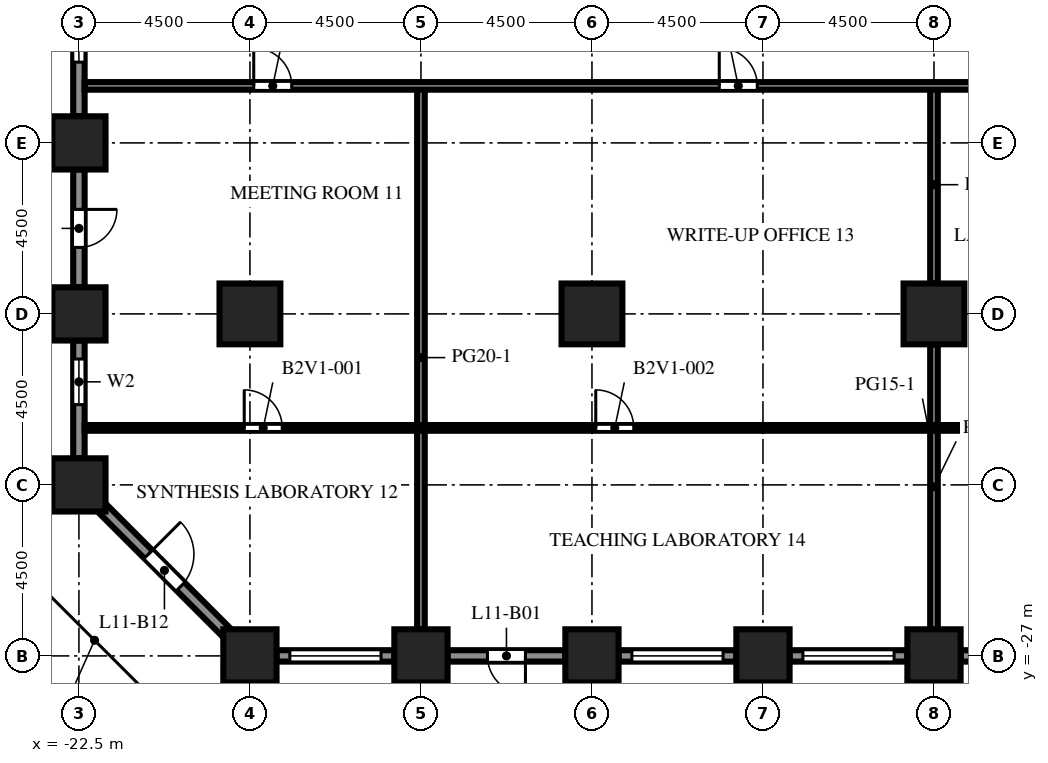
"""IFC4 building model, lengths in metres.
Left out: names, types, materials, properties, quantities, classifications, styles, units other than length and angle.
Written with IfcOpenShell. Run it as: python <this file> out.ifc"""

import sys

from ifc_helpers import new_model, si_unit, direction, frame, frame_2d, origin, origin_2d, place, context, subcontext, project, spatial, rectangle, extrude, element, fill, save


model = new_model("IFC4")
c1 = context("Model", 3, precision=1e-05, world=origin(), true_north=direction((0.0, 1.0)))
c2 = subcontext(c1, "Body", "Model", "MODEL_VIEW")
j1 = project(units=[si_unit("LENGTHUNIT", "METRE"), si_unit("PLANEANGLEUNIT", "RADIAN")], contexts=[c1])
p1 = place(None, origin())
s1 = spatial("IfcSite", under=j1, at=p1, CompositionType="ELEMENT")
p2 = place(p1, origin())
s2 = spatial("IfcBuilding", under=s1, at=p2, CompositionType="ELEMENT")
p3 = place(p2, frame((0.0, 0.0, 50.1)))
s3 = spatial("IfcBuildingStorey", under=s2, at=p3, CompositionType="ELEMENT", Elevation=50.1)
for number, where, z_axis, x_axis in (
    (1, (-22.5, -22.5, 0.0), (0.0, 0.0, 1.0), (1.0, 0.0, 0.0)),
    (2, (-22.5, -18.0, 0.0), (0.0, 0.0, 1.0), (1.0, 0.0, 0.0)),
    (3, (-22.5, -13.5, 0.0), (0.0, 0.0, 1.0), (1.0, 0.0, 0.0)),
    (4, (-18.0, -27.0, 0.0), (0.0, 0.0, 1.0), (1.0, 0.0, 0.0)),
    (5, (-13.5, -27.0, 0.0), (0.0, 0.0, 1.0), (1.0, 0.0, 0.0)),
    (6, (-9.0, -27.0, 0.0), (0.0, 0.0, 1.0), (1.0, 0.0, 0.0)),
    (7, (-4.5, -27.0, 0.0), (0.0, 0.0, 1.0), (1.0, 0.0, 0.0)),
    (8, (0.0, -27.0, 0.0), (0.0, 0.0, 1.0), (1.0, 0.0, 0.0)),
):
    element("IfcColumn", number, at=place(p3, frame(where, z_axis=z_axis, x_axis=x_axis)), inside=s3, PredefinedType="COLUMN", context=c2, shape_type="SweptSolid", body=[
        extrude(rectangle(XDim=1.4, YDim=1.4, at=origin_2d()), origin(), (0.0, 0.0, 1.0), 4.1),
    ])
for number, where, z_axis, x_axis in (
    (9, (-18.0, -18.0, 0.0), (0.0, 0.0, 1.0), (1.0, 0.0, 0.0)),
    (10, (-9.0, -18.0, 0.0), (0.0, 0.0, 1.0), (1.0, 0.0, 0.0)),
    (11, (0.0, -18.0, 0.0), (0.0, 0.0, 1.0), (1.0, 0.0, 0.0)),
):
    element("IfcColumn", number, at=place(p3, frame(where, z_axis=z_axis, x_axis=x_axis)), inside=s3, PredefinedType="COLUMN", context=c2, shape_type="SweptSolid", body=[
        extrude(rectangle(XDim=1.6, YDim=1.6, at=origin_2d()), origin(), (0.0, 0.0, 1.0), 4.1),
    ])
p4 = place(p3, frame((-14.2, -27.0, 0.0), z_axis=(0.0, 0.0, 1.0), x_axis=(-1.0, 0.0, 0.0)))
e12 = element("IfcWall", 12, at=p4, inside=s3, PredefinedType="SOLIDWALL", context=c2, shape_type="SweptSolid", body=[
    extrude(rectangle(XDim=3.1, YDim=0.3, at=frame_2d((1.55, 0.0))), origin(), (0.0, 0.0, 1.0), 2.75),
])
p5 = place(p4, frame((0.35, 0.0, 0.8)))
e13 = element("IfcOpeningElement", 13, at=p5, cuts=e12, PredefinedType="OPENING", context=c2, shape_type="SweptSolid", body=[
    extrude(rectangle(XDim=2.4, YDim=1.7, at=frame_2d((1.2, 0.85))), frame((0.0, 0.16, 0.0), z_axis=(0.0, -1.0, 0.0), x_axis=(1.0, 0.0, 0.0)), (0.0, 0.0, 1.0), 0.32),
])
p6 = place(p3, frame((-9.7, -27.0, 0.0), z_axis=(0.0, 0.0, 1.0), x_axis=(-1.0, 0.0, 0.0)))
e14 = element("IfcWall", 14, at=p6, inside=s3, PredefinedType="SOLIDWALL", context=c2, shape_type="SweptSolid", body=[
    extrude(rectangle(XDim=3.1, YDim=0.3, at=frame_2d((1.55, 0.0))), origin(), (0.0, 0.0, 1.0), 2.75),
])
p7 = place(p6, frame((1.05, 0.0, 0.0)))
e15 = element("IfcOpeningElement", 15, at=p7, cuts=e14, PredefinedType="OPENING", context=c2, shape_type="SweptSolid", body=[
    extrude(rectangle(XDim=1.0, YDim=2.2, at=frame_2d((0.5, 1.1))), frame((0.0, 0.16, 0.0), z_axis=(0.0, -1.0, 0.0), x_axis=(1.0, 0.0, 0.0)), (0.0, 0.0, 1.0), 0.32),
])
p8 = place(p3, frame((-5.2, -27.0, 0.0), z_axis=(0.0, 0.0, 1.0), x_axis=(-1.0, 0.0, 0.0)))
e16 = element("IfcWall", 16, at=p8, inside=s3, PredefinedType="SOLIDWALL", context=c2, shape_type="SweptSolid", body=[
    extrude(rectangle(XDim=3.1, YDim=0.3, at=frame_2d((1.55, 0.0))), origin(), (0.0, 0.0, 1.0), 2.75),
])
p9 = place(p8, frame((0.35, 0.0, 0.8)))
e17 = element("IfcOpeningElement", 17, at=p9, cuts=e16, PredefinedType="OPENING", context=c2, shape_type="SweptSolid", body=[
    extrude(rectangle(XDim=2.4, YDim=1.7, at=frame_2d((1.2, 0.85))), frame((0.0, 0.16, 0.0), z_axis=(0.0, -1.0, 0.0), x_axis=(1.0, 0.0, 0.0)), (0.0, 0.0, 1.0), 0.32),
])
p10 = place(p3, frame((-0.7, -27.0, 0.0), z_axis=(0.0, 0.0, 1.0), x_axis=(-1.0, 0.0, 0.0)))
e18 = element("IfcWall", 18, at=p10, inside=s3, PredefinedType="SOLIDWALL", context=c2, shape_type="SweptSolid", body=[
    extrude(rectangle(XDim=3.1, YDim=0.3, at=frame_2d((1.55, 0.0))), origin(), (0.0, 0.0, 1.0), 2.75),
])
p11 = place(p10, frame((0.35, 0.0, 0.8)))
e19 = element("IfcOpeningElement", 19, at=p11, cuts=e18, PredefinedType="OPENING", context=c2, shape_type="SweptSolid", body=[
    extrude(rectangle(XDim=2.4, YDim=1.7, at=frame_2d((1.2, 0.85))), frame((0.0, 0.16, 0.0), z_axis=(0.0, -1.0, 0.0), x_axis=(1.0, 0.0, 0.0)), (0.0, 0.0, 1.0), 0.32),
])
p12 = place(p3, frame((3.8, -27.0, 0.0), z_axis=(0.0, 0.0, 1.0), x_axis=(-1.0, 0.0, 0.0)))
e20 = element("IfcWall", 20, at=p12, inside=s3, PredefinedType="SOLIDWALL", context=c2, shape_type="SweptSolid", body=[
    extrude(rectangle(XDim=3.1, YDim=0.3, at=frame_2d((1.55, 0.0))), origin(), (0.0, 0.0, 1.0), 2.75),
])
p13 = place(p12, frame((0.35, 0.0, 0.8)))
e21 = element("IfcOpeningElement", 21, at=p13, cuts=e20, PredefinedType="OPENING", context=c2, shape_type="SweptSolid", body=[
    extrude(rectangle(XDim=2.4, YDim=1.7, at=frame_2d((1.2, 0.85))), frame((0.0, 0.16, 0.0), z_axis=(0.0, -1.0, 0.0), x_axis=(1.0, 0.0, 0.0)), (0.0, 0.0, 1.0), 0.32),
])
p14 = place(p3, frame((-22.5, -12.8, 0.0), z_axis=(0.0, 0.0, 1.0), x_axis=(0.0, 1.0, 0.0)))
e22 = element("IfcWall", 22, at=p14, inside=s3, PredefinedType="SOLIDWALL", context=c2, shape_type="SweptSolid", body=[
    extrude(rectangle(XDim=3.1, YDim=0.3, at=frame_2d((1.55, 0.0))), origin(), (0.0, 0.0, 1.0), 2.75),
])
p15 = place(p14, frame((1.425, 0.0, 0.8)))
e23 = element("IfcOpeningElement", 23, at=p15, cuts=e22, PredefinedType="OPENING", context=c2, shape_type="SweptSolid", body=[
    extrude(rectangle(XDim=1.2, YDim=1.7, at=frame_2d((0.6, 0.85))), frame((0.0, 0.16, 0.0), z_axis=(0.0, -1.0, 0.0), x_axis=(1.0, 0.0, 0.0)), (0.0, 0.0, 1.0), 0.32),
])
p16 = place(p3, frame((-22.5, -17.3, 0.0), z_axis=(0.0, 0.0, 1.0), x_axis=(0.0, 1.0, 0.0)))
e24 = element("IfcWall", 24, at=p16, inside=s3, PredefinedType="SOLIDWALL", context=c2, shape_type="SweptSolid", body=[
    extrude(rectangle(XDim=3.1, YDim=0.3, at=frame_2d((1.55, 0.0))), origin(), (0.0, 0.0, 1.0), 2.75),
])
p17 = place(p16, frame((1.05, 0.0, 0.0)))
e25 = element("IfcOpeningElement", 25, at=p17, cuts=e24, PredefinedType="OPENING", context=c2, shape_type="SweptSolid", body=[
    extrude(rectangle(XDim=1.0, YDim=2.2, at=frame_2d((0.5, 1.1))), frame((0.0, 0.16, 0.0), z_axis=(0.0, -1.0, 0.0), x_axis=(1.0, 0.0, 0.0)), (0.0, 0.0, 1.0), 0.32),
])
p18 = place(p3, frame((-22.5, -21.8, 0.0), z_axis=(0.0, 0.0, 1.0), x_axis=(0.0, 1.0, 0.0)))
e26 = element("IfcWall", 26, at=p18, inside=s3, PredefinedType="SOLIDWALL", context=c2, shape_type="SweptSolid", body=[
    extrude(rectangle(XDim=3.1, YDim=0.3, at=frame_2d((1.55, 0.0))), origin(), (0.0, 0.0, 1.0), 2.75),
])
p19 = place(p18, frame((1.413, 0.0, 0.8)))
e27 = element("IfcOpeningElement", 27, at=p19, cuts=e26, PredefinedType="OPENING", context=c2, shape_type="SweptSolid", body=[
    extrude(rectangle(XDim=1.2, YDim=1.7, at=frame_2d((0.6, 0.85))), frame((0.0, 0.16, 0.0), z_axis=(0.0, -1.0, 0.0), x_axis=(1.0, 0.0, 0.0)), (0.0, 0.0, 1.0), 0.32),
])
p20 = place(p3, frame((-18.594, -26.406, 0.0), z_axis=(0.0, 0.0, 1.0), x_axis=(-0.707106781187, 0.707106781187, 0.0)))
e28 = element("IfcWall", 28, at=p20, inside=s3, PredefinedType="SOLIDWALL", context=c2, shape_type="SweptSolid", body=[
    extrude(rectangle(XDim=4.684, YDim=0.3, at=frame_2d((2.342, 0.0))), origin(), (0.0, 0.0, 1.0), 2.75),
])
p21 = place(p20, frame((1.742, 0.0, 0.0)))
e29 = element("IfcOpeningElement", 29, at=p21, cuts=e28, PredefinedType="OPENING", context=c2, shape_type="SweptSolid", body=[
    extrude(rectangle(XDim=1.2, YDim=2.2, at=frame_2d((0.6, 1.1))), frame((0.0, 0.16, 0.0), z_axis=(0.0, -1.0, 0.0), x_axis=(1.0, 0.0, 0.0)), (0.0, 0.0, 1.0), 0.32),
])
p22 = place(p3, frame((-13.5, -26.3, 0.0), z_axis=(0.0, 0.0, 1.0), x_axis=(0.0, 1.0, 0.0)))
e30 = element("IfcWall", 30, at=p22, inside=s3, PredefinedType="PARTITIONING", context=c2, shape_type="SweptSolid", body=[
    extrude(rectangle(XDim=14.3, YDim=0.2, at=frame_2d((7.15, 0.0))), origin(), (0.0, 0.0, 1.0), 3.65),
])
p23 = place(p3, frame((0.0, -26.3, 0.0), z_axis=(0.0, 0.0, 1.0), x_axis=(0.0, 1.0, 0.0)))
e31 = element("IfcWall", 31, at=p23, inside=s3, PredefinedType="PARTITIONING", context=c2, shape_type="SweptSolid", body=[
    extrude(rectangle(XDim=7.5, YDim=0.2, at=frame_2d((3.75, 0.0))), origin(), (0.0, 0.0, 1.0), 3.65),
])
p24 = place(p3, frame((0.0, -17.2, 0.0), z_axis=(0.0, 0.0, 1.0), x_axis=(0.0, 1.0, 0.0)))
e32 = element("IfcWall", 32, at=p24, inside=s3, PredefinedType="PARTITIONING", context=c2, shape_type="SweptSolid", body=[
    extrude(rectangle(XDim=5.2, YDim=0.2, at=frame_2d((2.6, 0.0))), origin(), (0.0, 0.0, 1.0), 3.65),
])
p25 = place(p3, frame((31.35, -21.0, 0.0), z_axis=(0.0, 0.0, 1.0), x_axis=(-1.0, 0.0, 0.0)))
e33 = element("IfcWall", 33, at=p25, inside=s3, PredefinedType="PARTITIONING", context=c2, shape_type="SweptSolid", body=[
    extrude(rectangle(XDim=53.7, YDim=0.15, at=frame_2d((26.85, 0.0))), origin(), (0.0, 0.0, 1.0), 3.65),
])
p26 = place(p25, frame((48.5, 0.0, 0.0)))
e34 = element("IfcOpeningElement", 34, at=p26, cuts=e33, PredefinedType="OPENING", context=c2, shape_type="SweptSolid", body=[
    extrude(rectangle(XDim=1.0, YDim=2.1, at=frame_2d((0.5, 1.05))), frame((0.0, 0.085, 0.0), z_axis=(0.0, -1.0, 0.0), x_axis=(1.0, 0.0, 0.0)), (0.0, 0.0, 1.0), 0.17),
])
p27 = place(p25, frame((39.25, 0.0, 0.0)))
e35 = element("IfcOpeningElement", 35, at=p27, cuts=e33, PredefinedType="OPENING", context=c2, shape_type="SweptSolid", body=[
    extrude(rectangle(XDim=1.0, YDim=2.1, at=frame_2d((0.5, 1.05))), frame((0.0, 0.085, 0.0), z_axis=(0.0, -1.0, 0.0), x_axis=(1.0, 0.0, 0.0)), (0.0, 0.0, 1.0), 0.17),
])
p28 = place(p25, frame((22.75, 0.0, 0.0)))
e36 = element("IfcOpeningElement", 36, at=p28, cuts=e33, PredefinedType="OPENING", context=c2, shape_type="SweptSolid", body=[
    extrude(rectangle(XDim=1.0, YDim=2.1, at=frame_2d((0.5, 1.05))), frame((0.0, 0.085, 0.0), z_axis=(0.0, -1.0, 0.0), x_axis=(1.0, 0.0, 0.0)), (0.0, 0.0, 1.0), 0.17),
])
p29 = place(p25, frame((13.5, 0.0, 0.0)))
e37 = element("IfcOpeningElement", 37, at=p29, cuts=e33, PredefinedType="OPENING", context=c2, shape_type="SweptSolid", body=[
    extrude(rectangle(XDim=1.0, YDim=2.1, at=frame_2d((0.5, 1.05))), frame((0.0, 0.085, 0.0), z_axis=(0.0, -1.0, 0.0), x_axis=(1.0, 0.0, 0.0)), (0.0, 0.0, 1.0), 0.17),
])
p30 = place(p25, frame((3.25, 0.0, 0.0)))
e38 = element("IfcOpeningElement", 38, at=p30, cuts=e33, PredefinedType="OPENING", context=c2, shape_type="SweptSolid", body=[
    extrude(rectangle(XDim=1.0, YDim=2.1, at=frame_2d((0.5, 1.05))), frame((0.0, 0.085, 0.0), z_axis=(0.0, -1.0, 0.0), x_axis=(1.0, 0.0, 0.0)), (0.0, 0.0, 1.0), 0.17),
])
p31 = place(p3, frame((31.35, -12.0, 0.0), z_axis=(0.0, 0.0, 1.0), x_axis=(-1.0, 0.0, 0.0)))
e39 = element("IfcWall", 39, at=p31, inside=s3, PredefinedType="PARTITIONING", context=c2, shape_type="SweptSolid", body=[
    extrude(rectangle(XDim=53.7, YDim=0.2, at=frame_2d((26.85, 0.0))), origin(), (0.0, 0.0, 1.0), 3.65),
])
p32 = place(p31, frame((48.25, 0.0, 0.0)))
e40 = element("IfcOpeningElement", 40, at=p32, cuts=e39, PredefinedType="OPENING", context=c2, shape_type="SweptSolid", body=[
    extrude(rectangle(XDim=1.0, YDim=2.1, at=frame_2d((0.5, 1.05))), frame((0.0, 0.11, 0.0), z_axis=(0.0, -1.0, 0.0), x_axis=(1.0, 0.0, 0.0)), (0.0, 0.0, 1.0), 0.22),
])
p33 = place(p31, frame((36.0, 0.0, 0.0)))
e41 = element("IfcOpeningElement", 41, at=p33, cuts=e39, PredefinedType="OPENING", context=c2, shape_type="SweptSolid", body=[
    extrude(rectangle(XDim=1.0, YDim=2.1, at=frame_2d((0.5, 1.05))), frame((0.0, 0.11, 0.0), z_axis=(0.0, -1.0, 0.0), x_axis=(1.0, 0.0, 0.0)), (0.0, 0.0, 1.0), 0.22),
])
p34 = place(p31, frame((25.75, 0.0, 0.0)))
e42 = element("IfcOpeningElement", 42, at=p34, cuts=e39, PredefinedType="OPENING", context=c2, shape_type="SweptSolid", body=[
    extrude(rectangle(XDim=1.0, YDim=2.1, at=frame_2d((0.5, 1.05))), frame((0.0, 0.11, 0.0), z_axis=(0.0, -1.0, 0.0), x_axis=(1.0, 0.0, 0.0)), (0.0, 0.0, 1.0), 0.22),
])
p35 = place(p31, frame((12.5, 0.0, 0.0)))
e43 = element("IfcOpeningElement", 43, at=p35, cuts=e39, PredefinedType="OPENING", context=c2, shape_type="SweptSolid", body=[
    extrude(rectangle(XDim=1.0, YDim=2.1, at=frame_2d((0.5, 1.05))), frame((0.0, 0.11, 0.0), z_axis=(0.0, -1.0, 0.0), x_axis=(1.0, 0.0, 0.0)), (0.0, 0.0, 1.0), 0.22),
])
p36 = place(p31, frame((3.75, 0.0, 0.0)))
e44 = element("IfcOpeningElement", 44, at=p36, cuts=e39, PredefinedType="OPENING", context=c2, shape_type="SweptSolid", body=[
    extrude(rectangle(XDim=1.0, YDim=2.1, at=frame_2d((0.5, 1.05))), frame((0.0, 0.11, 0.0), z_axis=(0.0, -1.0, 0.0), x_axis=(1.0, 0.0, 0.0)), (0.0, 0.0, 1.0), 0.22),
])
p37 = place(p5, origin())
e45 = element("IfcWindow", 45, at=p37, inside=s3, PartitioningType="SINGLE_PANEL", PredefinedType="WINDOW", context=c2, shape_type="SweptSolid", body=[
    extrude(rectangle(XDim=2.4, YDim=1.7, at=frame_2d((1.2, 0.85))), frame((0.0, 0.03, 0.0), z_axis=(0.0, -1.0, 0.0), x_axis=(1.0, 0.0, 0.0)), (0.0, 0.0, 1.0), 0.06),
])
fill(e13, e45)
p38 = place(p7, origin())
e46 = element("IfcDoor", 46, at=p38, inside=s3, OperationType="SINGLE_SWING_LEFT", PredefinedType="DOOR", context=c2, shape_type="SweptSolid", body=[
    extrude(rectangle(XDim=1.0, YDim=2.2, at=frame_2d((0.5, 1.1))), frame((0.0, 0.025, 0.0), z_axis=(0.0, -1.0, 0.0), x_axis=(1.0, 0.0, 0.0)), (0.0, 0.0, 1.0), 0.05),
])
fill(e15, e46)
p39 = place(p9, origin())
e47 = element("IfcWindow", 47, at=p39, inside=s3, PartitioningType="SINGLE_PANEL", PredefinedType="WINDOW", context=c2, shape_type="SweptSolid", body=[
    extrude(rectangle(XDim=2.4, YDim=1.7, at=frame_2d((1.2, 0.85))), frame((0.0, 0.03, 0.0), z_axis=(0.0, -1.0, 0.0), x_axis=(1.0, 0.0, 0.0)), (0.0, 0.0, 1.0), 0.06),
])
fill(e17, e47)
p40 = place(p11, origin())
e48 = element("IfcWindow", 48, at=p40, inside=s3, PartitioningType="SINGLE_PANEL", PredefinedType="WINDOW", context=c2, shape_type="SweptSolid", body=[
    extrude(rectangle(XDim=2.4, YDim=1.7, at=frame_2d((1.2, 0.85))), frame((0.0, 0.03, 0.0), z_axis=(0.0, -1.0, 0.0), x_axis=(1.0, 0.0, 0.0)), (0.0, 0.0, 1.0), 0.06),
])
fill(e19, e48)
p41 = place(p15, origin())
e49 = element("IfcWindow", 49, at=p41, inside=s3, PartitioningType="SINGLE_PANEL", PredefinedType="WINDOW", context=c2, shape_type="SweptSolid", body=[
    extrude(rectangle(XDim=1.2, YDim=1.7, at=frame_2d((0.6, 0.85))), frame((0.0, 0.03, 0.0), z_axis=(0.0, -1.0, 0.0), x_axis=(1.0, 0.0, 0.0)), (0.0, 0.0, 1.0), 0.06),
])
fill(e23, e49)
p42 = place(p17, origin())
e50 = element("IfcDoor", 50, at=p42, inside=s3, OperationType="SINGLE_SWING_RIGHT", PredefinedType="DOOR", context=c2, shape_type="SweptSolid", body=[
    extrude(rectangle(XDim=1.0, YDim=2.2, at=frame_2d((0.5, 1.1))), frame((0.0, 0.025, 0.0), z_axis=(0.0, -1.0, 0.0), x_axis=(1.0, 0.0, 0.0)), (0.0, 0.0, 1.0), 0.05),
])
fill(e25, e50)
p43 = place(p19, origin())
e51 = element("IfcWindow", 51, at=p43, inside=s3, PartitioningType="SINGLE_PANEL", PredefinedType="WINDOW", context=c2, shape_type="SweptSolid", body=[
    extrude(rectangle(XDim=1.2, YDim=1.7, at=frame_2d((0.6, 0.85))), frame((0.0, 0.03, 0.0), z_axis=(0.0, -1.0, 0.0), x_axis=(1.0, 0.0, 0.0)), (0.0, 0.0, 1.0), 0.06),
])
fill(e27, e51)
p44 = place(p21, origin())
e52 = element("IfcDoor", 52, at=p44, inside=s3, OperationType="SINGLE_SWING_RIGHT", PredefinedType="DOOR", context=c2, shape_type="SweptSolid", body=[
    extrude(rectangle(XDim=1.2, YDim=2.2, at=frame_2d((0.6, 1.1))), frame((0.0, 0.025, 0.0), z_axis=(0.0, -1.0, 0.0), x_axis=(1.0, 0.0, 0.0)), (0.0, 0.0, 1.0), 0.05),
])
fill(e29, e52)
p45 = place(p26, origin())
e53 = element("IfcDoor", 53, at=p45, inside=s3, OperationType="SINGLE_SWING_RIGHT", PredefinedType="DOOR", context=c2, shape_type="SweptSolid", body=[
    extrude(rectangle(XDim=1.0, YDim=2.1, at=frame_2d((0.5, 1.05))), frame((0.0, 0.025, 0.0), z_axis=(0.0, -1.0, 0.0), x_axis=(1.0, 0.0, 0.0)), (0.0, 0.0, 1.0), 0.05),
])
fill(e34, e53)
p46 = place(p27, origin())
e54 = element("IfcDoor", 54, at=p46, inside=s3, OperationType="SINGLE_SWING_RIGHT", PredefinedType="DOOR", context=c2, shape_type="SweptSolid", body=[
    extrude(rectangle(XDim=1.0, YDim=2.1, at=frame_2d((0.5, 1.05))), frame((0.0, 0.025, 0.0), z_axis=(0.0, -1.0, 0.0), x_axis=(1.0, 0.0, 0.0)), (0.0, 0.0, 1.0), 0.05),
])
fill(e35, e54)
p47 = place(p32, origin())
e55 = element("IfcDoor", 55, at=p47, inside=s3, OperationType="SINGLE_SWING_RIGHT", PredefinedType="DOOR", context=c2, shape_type="SweptSolid", body=[
    extrude(rectangle(XDim=1.0, YDim=2.1, at=frame_2d((0.5, 1.05))), frame((0.0, 0.025, 0.0), z_axis=(0.0, -1.0, 0.0), x_axis=(1.0, 0.0, 0.0)), (0.0, 0.0, 1.0), 0.05),
])
fill(e40, e55)
p48 = place(p33, origin())
e56 = element("IfcDoor", 56, at=p48, inside=s3, OperationType="SINGLE_SWING_RIGHT", PredefinedType="DOOR", context=c2, shape_type="SweptSolid", body=[
    extrude(rectangle(XDim=1.0, YDim=2.1, at=frame_2d((0.5, 1.05))), frame((0.0, 0.025, 0.0), z_axis=(0.0, -1.0, 0.0), x_axis=(1.0, 0.0, 0.0)), (0.0, 0.0, 1.0), 0.05),
])
fill(e41, e56)
save(model, sys.argv[1])
